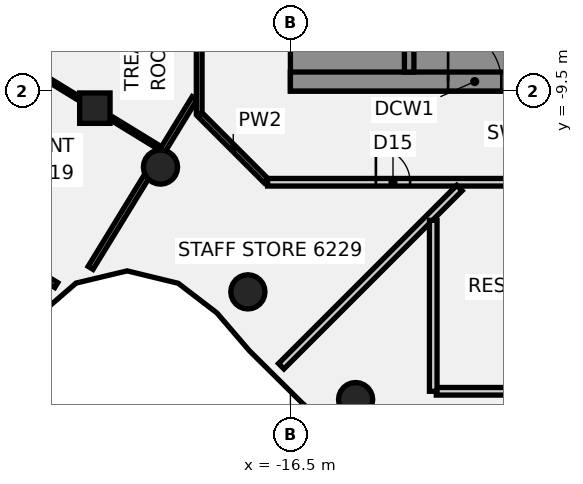
"""IFC4 building model, lengths in metres.
Left out: names, types, materials, properties, quantities, classifications, styles, units other than length and angle.
Written with IfcOpenShell. Run it as: python <this file> out.ifc"""

import sys

from ifc_helpers import new_model, si_unit, direction, frame, frame_2d, origin, origin_2d, place, context, subcontext, project, spatial, polyline, rectangle, circle, outline, extrude, element, fill, save


model = new_model("IFC4")
c1 = context("Model", 3, precision=1e-05, world=origin(), true_north=direction((0.0, 1.0)))
c2 = subcontext(c1, "Body", "Model", "MODEL_VIEW")
j1 = project(units=[si_unit("LENGTHUNIT", "METRE"), si_unit("PLANEANGLEUNIT", "RADIAN")], contexts=[c1])
p1 = place(None, origin())
s1 = spatial("IfcSite", under=j1, at=p1, CompositionType="ELEMENT")
p2 = place(p1, origin())
s2 = spatial("IfcBuilding", under=s1, at=p2, CompositionType="ELEMENT")
p3 = place(p2, frame((0.0, 0.0, 245.1)))
s3 = spatial("IfcBuildingStorey", under=s2, at=p3, CompositionType="ELEMENT", Elevation=245.1)
for number, where, z_axis, x_axis in (
    (1, (-19.919, -11.5, -0.14), (0.0, 0.0, 1.0), (1.0, 0.0, 0.0)),
    (2, (-17.619, -14.784, -0.14), (0.0, 0.0, 1.0), (1.0, 0.0, 0.0)),
    (3, (-14.784, -17.619, -0.14), (0.0, 0.0, 1.0), (1.0, 0.0, 0.0)),
):
    element("IfcColumn", number, at=place(p3, frame(where, z_axis=z_axis, x_axis=x_axis)), inside=s3, PredefinedType="COLUMN", context=c2, shape_type="SweptSolid", body=[
        extrude(circle(Radius=0.45, at=origin_2d()), origin(), (0.0, 0.0, 1.0), 3.6),
    ])
p4 = place(p3, frame((-21.646, -9.951, -0.139), z_axis=(0.050289032263, 0.002304349187, 0.998732047753), x_axis=(-0.852234898638, 0.521494023038, 0.041709249322)))
e4 = element("IfcColumn", 4, at=p4, inside=s3, PredefinedType="COLUMN", context=c2, shape_type="SweptSolid", body=[
    extrude(rectangle(XDim=0.8, YDim=0.8, at=origin_2d()), origin(), (0.0, 0.0, 1.0), 3.602),
])
p5 = place(p3, frame((-18.872, -10.128, 0.0), z_axis=(0.0, 0.0, 1.0), x_axis=(0.707106781187, -0.707106781187, 0.0)))
e5 = element("IfcWall", 5, at=p5, inside=s3, PredefinedType="PARTITIONING", context=c2, shape_type="SweptSolid", body=[
    extrude(rectangle(XDim=2.455, YDim=0.15, at=frame_2d((1.228, 0.0))), origin(), (0.0, 0.0, 1.0), 2.864),
])
p6 = place(p3, frame((-29.676, -10.309, 0.0), z_axis=(0.0, 0.0, 1.0), x_axis=(0.852748796972, -0.522321251016, 0.0)))
e6 = element("IfcWall", 6, at=p6, inside=s3, PredefinedType="PARTITIONING", context=c2, shape_type="SweptSolid", body=[
    extrude(rectangle(XDim=8.227, YDim=0.15, at=frame_2d((4.113, 0.0))), origin(), (0.0, 0.0, 1.0), 2.864),
])
p7 = place(p6, frame((0.3, 0.0, 0.0)))
e7 = element("IfcOpeningElement", 7, at=p7, cuts=e6, PredefinedType="OPENING", context=c2, shape_type="SweptSolid", body=[
    extrude(rectangle(XDim=1.8, YDim=2.1, at=frame_2d((0.9, 1.05))), frame((0.0, 0.085, 0.0), z_axis=(0.0, -1.0, 0.0), x_axis=(1.0, 0.0, 0.0)), (0.0, 0.0, 1.0), 0.17),
])
p8 = place(p3, frame((-25.248, -7.743, 0.0), z_axis=(0.0, 0.0, 1.0), x_axis=(0.852641647662, -0.522496144169, 0.0)))
e8 = element("IfcWall", 8, at=p8, inside=s3, PredefinedType="PARTITIONING", context=c2, shape_type="SweptSolid", body=[
    extrude(rectangle(XDim=3.822, YDim=0.1, at=frame_2d((1.911, 0.0))), origin(), (0.0, 0.0, 1.0), 2.864),
])
p9 = place(p3, frame((-21.177, -10.238, 0.0), z_axis=(0.0, 0.0, 1.0), x_axis=(0.852622654042, -0.522527137874, 0.0)))
e9 = element("IfcWall", 9, at=p9, inside=s3, PredefinedType="PARTITIONING", context=c2, shape_type="SweptSolid", body=[
    extrude(rectangle(XDim=1.476, YDim=0.1, at=frame_2d((0.738, 0.0))), origin(), (0.0, 0.0, 1.0), 2.864),
])
p10 = place(p3, frame((-17.1, -11.9, 0.0), z_axis=(0.0, 0.0, 1.0), x_axis=(1.0, 0.0, 0.0)))
e10 = element("IfcWall", 10, at=p10, inside=s3, PredefinedType="PARTITIONING", context=c2, shape_type="SweptSolid", body=[
    extrude(rectangle(XDim=34.165, YDim=0.2, at=frame_2d((17.083, 0.0))), origin(), (0.0, 0.0, 1.0), 2.864),
])
p11 = place(p10, frame((9.85, 0.0, 0.0)))
e11 = element("IfcOpeningElement", 11, at=p11, cuts=e10, PredefinedType="OPENING", context=c2, shape_type="SweptSolid", body=[
    extrude(rectangle(XDim=0.9, YDim=2.1, at=frame_2d((0.45, 1.05))), frame((0.0, 0.11, 0.0), z_axis=(0.0, -1.0, 0.0), x_axis=(1.0, 0.0, 0.0)), (0.0, 0.0, 1.0), 0.22),
])
p12 = place(p10, frame((26.941, 0.0, 0.0)))
e12 = element("IfcOpeningElement", 12, at=p12, cuts=e10, PredefinedType="OPENING", context=c2, shape_type="SweptSolid", body=[
    extrude(rectangle(XDim=0.9, YDim=2.1, at=frame_2d((0.45, 1.05))), frame((0.0, 0.11, 0.0), z_axis=(0.0, -1.0, 0.0), x_axis=(1.0, 0.0, 0.0)), (0.0, 0.0, 1.0), 0.22),
])
p13 = place(p10, frame((16.059, 0.0, 0.0)))
e13 = element("IfcOpeningElement", 13, at=p13, cuts=e10, PredefinedType="OPENING", context=c2, shape_type="SweptSolid", body=[
    extrude(rectangle(XDim=1.8, YDim=2.1, at=frame_2d((0.9, 1.05))), frame((0.0, 0.11, 0.0), z_axis=(0.0, -1.0, 0.0), x_axis=(1.0, 0.0, 0.0)), (0.0, 0.0, 1.0), 0.22),
])
p14 = place(p10, frame((22.548, 0.0, 0.0)))
e14 = element("IfcOpeningElement", 14, at=p14, cuts=e10, PredefinedType="OPENING", context=c2, shape_type="SweptSolid", body=[
    extrude(rectangle(XDim=1.8, YDim=2.1, at=frame_2d((0.9, 1.05))), frame((0.0, 0.11, 0.0), z_axis=(0.0, -1.0, 0.0), x_axis=(1.0, 0.0, 0.0)), (0.0, 0.0, 1.0), 0.22),
])
p15 = place(p10, frame((31.7, 0.0, 0.0)))
e15 = element("IfcOpeningElement", 15, at=p15, cuts=e10, PredefinedType="OPENING", context=c2, shape_type="SweptSolid", body=[
    extrude(rectangle(XDim=0.9, YDim=2.1, at=frame_2d((0.45, 1.05))), frame((0.0, 0.11, 0.0), z_axis=(0.0, -1.0, 0.0), x_axis=(1.0, 0.0, 0.0)), (0.0, 0.0, 1.0), 0.22),
])
p16 = place(p10, frame((2.85, 0.0, 0.0)))
e16 = element("IfcOpeningElement", 16, at=p16, cuts=e10, PredefinedType="OPENING", context=c2, shape_type="SweptSolid", body=[
    extrude(rectangle(XDim=0.9, YDim=2.1, at=frame_2d((0.45, 1.05))), frame((0.0, 0.11, 0.0), z_axis=(0.0, -1.0, 0.0), x_axis=(1.0, 0.0, 0.0)), (0.0, 0.0, 1.0), 0.22),
])
p17 = place(p3, frame((-12.661, -17.4, 0.0), z_axis=(0.0, 0.0, 1.0), x_axis=(1.0, 0.0, 0.0)))
e17 = element("IfcWall", 17, at=p17, inside=s3, PredefinedType="PARTITIONING", context=c2, shape_type="SweptSolid", body=[
    extrude(rectangle(XDim=8.835, YDim=0.2, at=frame_2d((4.417, 0.0))), origin(), (0.0, 0.0, 1.0), 2.864),
])
p18 = place(p3, frame((-16.74, -16.74, 0.0), z_axis=(0.0, 0.0, 1.0), x_axis=(0.707106781187, 0.707106781187, 0.0)))
e18 = element("IfcWall", 18, at=p18, inside=s3, PredefinedType="PARTITIONING", context=c2, shape_type="SweptSolid", body=[
    extrude(rectangle(XDim=6.631, YDim=0.2, at=frame_2d((3.315, 0.0))), origin(), (0.0, 0.0, 1.0), 2.864),
])
p19 = place(p3, frame((-21.758, -14.153, 0.0), z_axis=(0.0, 0.0, 1.0), x_axis=(0.522549830929, 0.852608746258, 0.0)))
e19 = element("IfcWall", 19, at=p19, inside=s3, PredefinedType="PARTITIONING", context=c2, shape_type="SweptSolid", body=[
    extrude(rectangle(XDim=2.809, YDim=0.15, at=frame_2d((1.405, 0.0))), origin(), (0.0, 0.0, 1.0), 2.864),
])
p20 = place(p3, frame((-19.86, -11.056, 0.0), z_axis=(0.0, 0.0, 1.0), x_axis=(0.522579863892, 0.852590338823, 0.0)))
e20 = element("IfcWall", 20, at=p20, inside=s3, PredefinedType="PARTITIONING", context=c2, shape_type="SweptSolid", body=[
    extrude(rectangle(XDim=1.608, YDim=0.15, at=frame_2d((0.804, 0.0))), origin(), (0.0, 0.0, 1.0), 2.864),
])
p21 = place(p3, frame((-18.9, -10.1, 0.0), z_axis=(0.0, 0.0, 1.0), x_axis=(0.0, 1.0, 0.0)))
e21 = element("IfcWall", 21, at=p21, inside=s3, PredefinedType="PARTITIONING", context=c2, shape_type="SweptSolid", body=[
    extrude(rectangle(XDim=20.2, YDim=0.15, at=frame_2d((10.1, 0.0))), origin(), (0.0, 0.0, 1.0), 2.864),
])
p22 = place(p21, frame((13.598, 0.0, 0.0)))
e22 = element("IfcOpeningElement", 22, at=p22, cuts=e21, PredefinedType="OPENING", context=c2, shape_type="SweptSolid", body=[
    extrude(rectangle(XDim=1.8, YDim=2.1, at=frame_2d((0.9, 1.05))), frame((0.0, 0.085, 0.0), z_axis=(0.0, -1.0, 0.0), x_axis=(1.0, 0.0, 0.0)), (0.0, 0.0, 1.0), 0.17),
])
p23 = place(p21, frame((8.545, 0.0, 0.0)))
e23 = element("IfcOpeningElement", 23, at=p23, cuts=e21, PredefinedType="OPENING", context=c2, shape_type="SweptSolid", body=[
    extrude(rectangle(XDim=0.9, YDim=2.1, at=frame_2d((0.45, 1.05))), frame((0.0, 0.085, 0.0), z_axis=(0.0, -1.0, 0.0), x_axis=(1.0, 0.0, 0.0)), (0.0, 0.0, 1.0), 0.17),
])
p24 = place(p3, frame((-12.741, -17.4, 0.0), z_axis=(0.0, 0.0, 1.0), x_axis=(0.0, 1.0, 0.0)))
e24 = element("IfcWall", 24, at=p24, inside=s3, PredefinedType="PARTITIONING", context=c2, shape_type="SweptSolid", body=[
    extrude(rectangle(XDim=4.499, YDim=0.2, at=frame_2d((2.25, 0.0))), origin(), (0.0, 0.0, 1.0), 2.864),
])
p25 = place(p3, frame((-16.5, -9.25, 0.0), z_axis=(0.0, 0.0, 1.0), x_axis=(1.0, 0.0, 0.0)))
e25 = element("IfcWall", 25, at=p25, inside=s3, PredefinedType="SHEAR", context=c2, shape_type="SweptSolid", body=[
    extrude(rectangle(XDim=13.0, YDim=0.5, at=frame_2d((6.5, 0.0))), origin(), (0.0, 0.0, 1.0), 3.46),
])
p26 = place(p25, frame((4.15, 0.0, 0.0)))
e26 = element("IfcOpeningElement", 26, at=p26, cuts=e25, PredefinedType="OPENING", context=c2, shape_type="SweptSolid", body=[
    extrude(rectangle(XDim=1.4, YDim=2.1, at=frame_2d((0.7, 1.05))), frame((0.0, 0.26, 0.0), z_axis=(0.0, -1.0, 0.0), x_axis=(1.0, 0.0, 0.0)), (0.0, 0.0, 1.0), 0.52),
])
p27 = place(p25, frame((10.125, 0.0, 0.0)))
e27 = element("IfcOpeningElement", 27, at=p27, cuts=e25, PredefinedType="OPENING", context=c2, shape_type="SweptSolid", body=[
    extrude(rectangle(XDim=1.4, YDim=2.1, at=frame_2d((0.7, 1.05))), frame((0.0, 0.26, 0.0), z_axis=(0.0, -1.0, 0.0), x_axis=(1.0, 0.0, 0.0)), (0.0, 0.0, 1.0), 0.52),
])
p28 = place(p3, origin())
e28 = element("IfcWall", 28, at=p28, inside=s3, PredefinedType="SHEAR", context=c2, shape_type="SweptSolid", body=[
    extrude(outline(polyline([(-13.5, -8.125), (-16.0, -8.125), (-16.0, -5.625), (-13.5, -5.625), (-13.5, -5.375), (-16.0, -5.375), (-16.0, 5.375), (-13.5, 5.375), (-13.5, 5.625), (-16.0, 5.625), (-16.0, 8.125), (-13.5, 8.125), (-13.5, 9.0), (-16.0, 9.0), (-16.5, 9.0), (-16.5, -9.0), (-16.0, -9.0), (-13.5, -9.0), (-13.5, -8.125)])), origin(), (0.0, 0.0, 1.0), 3.46),
])
p29 = place(p3, frame((-13.375, -9.0, 0.0), z_axis=(0.0, 0.0, 1.0), x_axis=(0.0, 1.0, 0.0)))
e29 = element("IfcWall", 29, at=p29, inside=s3, PredefinedType="SHEAR", context=c2, shape_type="SweptSolid", body=[
    extrude(rectangle(XDim=18.0, YDim=0.25, at=frame_2d((9.0, 0.0))), origin(), (0.0, 0.0, 1.0), 3.46),
])
p30 = place(p29, frame((1.425, 0.0, 0.0)))
e30 = element("IfcOpeningElement", 30, at=p30, cuts=e29, PredefinedType="OPENING", context=c2, shape_type="SweptSolid", body=[
    extrude(rectangle(XDim=1.4, YDim=2.1, at=frame_2d((0.7, 1.05))), frame((0.0, 0.135, 0.0), z_axis=(0.0, -1.0, 0.0), x_axis=(1.0, 0.0, 0.0)), (0.0, 0.0, 1.0), 0.27),
])
p31 = place(p29, frame((4.854, 0.0, 0.0)))
e31 = element("IfcOpeningElement", 31, at=p31, cuts=e29, PredefinedType="OPENING", context=c2, shape_type="SweptSolid", body=[
    extrude(rectangle(XDim=1.0, YDim=2.1, at=frame_2d((0.5, 1.05))), frame((0.0, 0.135, 0.0), z_axis=(0.0, -1.0, 0.0), x_axis=(1.0, 0.0, 0.0)), (0.0, 0.0, 1.0), 0.27),
])
p32 = place(p29, frame((10.354, 0.0, 0.0)))
e32 = element("IfcOpeningElement", 32, at=p32, cuts=e29, PredefinedType="OPENING", context=c2, shape_type="SweptSolid", body=[
    extrude(rectangle(XDim=1.0, YDim=2.1, at=frame_2d((0.5, 1.05))), frame((0.0, 0.135, 0.0), z_axis=(0.0, -1.0, 0.0), x_axis=(1.0, 0.0, 0.0)), (0.0, 0.0, 1.0), 0.27),
])
p33 = place(p16, frame((0.9, 0.0, 0.0), z_axis=(0.0, 0.0, 1.0), x_axis=(-1.0, 0.0, 0.0)))
e33 = element("IfcDoor", 33, at=p33, inside=s3, OperationType="SINGLE_SWING_LEFT", PredefinedType="DOOR", context=c2, shape_type="SweptSolid", body=[
    extrude(rectangle(XDim=0.9, YDim=2.1, at=frame_2d((0.45, 1.05))), frame((0.0, 0.025, 0.0), z_axis=(0.0, -1.0, 0.0), x_axis=(1.0, 0.0, 0.0)), (0.0, 0.0, 1.0), 0.05),
])
fill(e16, e33)
p34 = place(p26, origin())
e34 = element("IfcDoor", 34, at=p34, inside=s3, OperationType="SINGLE_SWING_LEFT", PredefinedType="DOOR", context=c2, shape_type="SweptSolid", body=[
    extrude(rectangle(XDim=1.4, YDim=2.1, at=frame_2d((0.7, 1.05))), frame((0.0, 0.025, 0.0), z_axis=(0.0, -1.0, 0.0), x_axis=(1.0, 0.0, 0.0)), (0.0, 0.0, 1.0), 0.05),
])
fill(e26, e34)
save(model, sys.argv[1])
